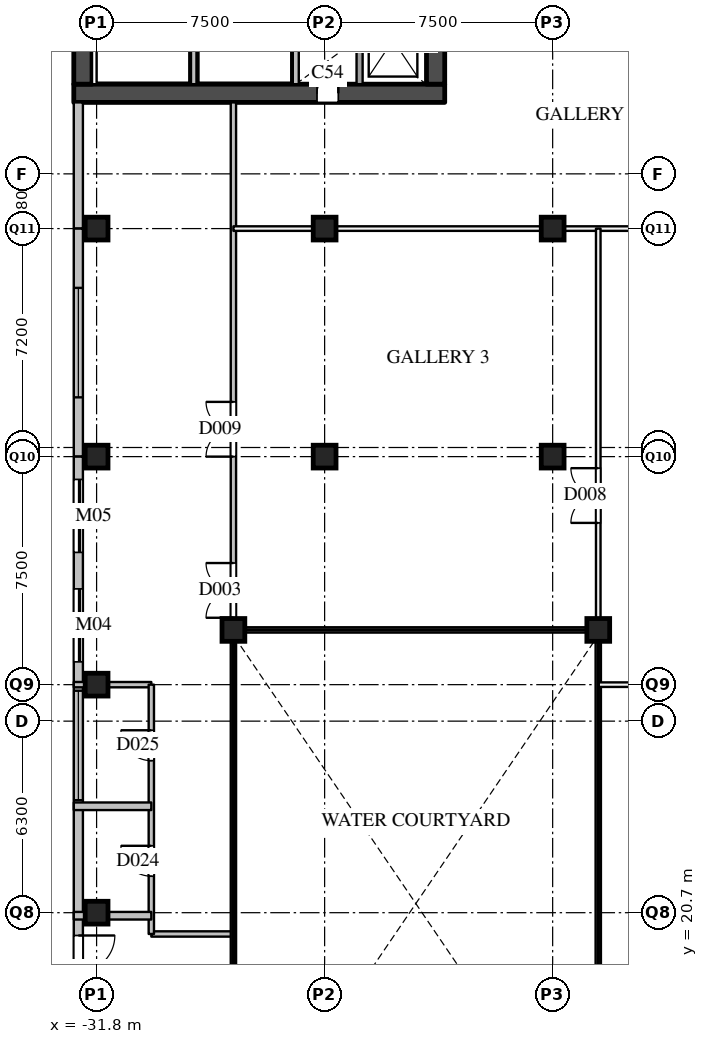
"""IFC4 building model, lengths in metres.
Left out: names, types, materials, properties, quantities, classifications, styles, units other than length and angle.
Written with IfcOpenShell. Run it as: python <this file> out.ifc"""

import sys

from ifc_helpers import new_model, si_unit, direction, frame, frame_2d, origin, origin_2d, place, context, subcontext, project, spatial, rectangle, extrude, element, fill, save


model = new_model("IFC4")
c1 = context("Model", 3, precision=1e-05, world=origin(), true_north=direction((0.0, 1.0)))
c2 = subcontext(c1, "Body", "Model", "MODEL_VIEW")
j1 = project(units=[si_unit("LENGTHUNIT", "METRE"), si_unit("PLANEANGLEUNIT", "RADIAN")], contexts=[c1])
p1 = place(None, origin())
s1 = spatial("IfcSite", under=j1, at=p1, CompositionType="ELEMENT")
p2 = place(p1, origin())
s2 = spatial("IfcBuilding", under=s1, at=p2, CompositionType="ELEMENT")
p3 = place(p2, origin())
s3 = spatial("IfcBuildingStorey", under=s2, at=p3, CompositionType="ELEMENT", Elevation=0.0)
for number, where, z_axis, x_axis in (
    (1, (-31.8, 20.7, 0.0), (0.0, 0.0, 1.0), (1.0, 0.0, 0.0)),
    (2, (-31.8, 28.2, 0.0), (0.0, 0.0, 1.0), (1.0, 0.0, 0.0)),
    (3, (-31.8, 35.7, 0.0), (0.0, 0.0, 1.0), (1.0, 0.0, 0.0)),
    (4, (-31.8, 43.2, 0.0), (0.0, 0.0, 1.0), (1.0, 0.0, 0.0)),
    (5, (-24.3, 35.7, 0.0), (0.0, 0.0, 1.0), (1.0, 0.0, 0.0)),
    (6, (-24.3, 43.2, 0.0), (0.0, 0.0, 1.0), (1.0, 0.0, 0.0)),
    (7, (-16.8, 35.7, 0.0), (0.0, 0.0, 1.0), (1.0, 0.0, 0.0)),
    (8, (-16.8, 43.2, 0.0), (0.0, 0.0, 1.0), (1.0, 0.0, 0.0)),
    (9, (-15.3, 30.0, 0.0), (0.0, 0.0, 1.0), (1.0, 0.0, 0.0)),
    (10, (-27.3, 30.0, 0.0), (0.0, 0.0, 1.0), (1.0, 0.0, 0.0)),
):
    element("IfcColumn", number, at=place(p3, frame(where, z_axis=z_axis, x_axis=x_axis)), inside=s3, PredefinedType="COLUMN", context=c2, shape_type="SweptSolid", body=[
        extrude(rectangle(XDim=0.75, YDim=0.75, at=origin_2d()), origin(), (0.0, 0.0, 1.0), 8.0),
    ])
p4 = place(p3, frame((-32.4, 47.35, 0.0), z_axis=(0.0, 0.0, 1.0), x_axis=(0.0, -1.0, 0.0)))
e11 = element("IfcWall", 11, at=p4, inside=s3, PredefinedType="SOLIDWALL", context=c2, shape_type="SweptSolid", body=[
    extrude(rectangle(XDim=4.15, YDim=0.3, at=frame_2d((2.075, 0.0))), origin(), (0.0, 0.0, 1.0), 7.59),
])
p5 = place(p3, frame((-32.4, 43.2, 0.0), z_axis=(0.0, 0.0, 1.0), x_axis=(0.0, -1.0, 0.0)))
e12 = element("IfcWall", 12, at=p5, inside=s3, PredefinedType="SOLIDWALL", context=c2, shape_type="SweptSolid", body=[
    extrude(rectangle(XDim=7.5, YDim=0.3, at=frame_2d((3.75, 0.0))), origin(), (0.0, 0.0, 1.0), 7.59),
])
p6 = place(p5, frame((1.95, 0.0, 0.9)))
e13 = element("IfcOpeningElement", 13, at=p6, cuts=e12, PredefinedType="OPENING", context=c2, shape_type="SweptSolid", body=[
    extrude(rectangle(XDim=3.6, YDim=3.0, at=frame_2d((1.8, 1.5))), frame((0.0, 0.16, 0.0), z_axis=(0.0, -1.0, 0.0), x_axis=(1.0, 0.0, 0.0)), (0.0, 0.0, 1.0), 0.32),
])
p7 = place(p3, frame((-32.4, 35.7, 0.0), z_axis=(0.0, 0.0, 1.0), x_axis=(0.0, -1.0, 0.0)))
e14 = element("IfcWall", 14, at=p7, inside=s3, PredefinedType="SOLIDWALL", context=c2, shape_type="SweptSolid", body=[
    extrude(rectangle(XDim=7.5, YDim=0.3, at=frame_2d((3.75, 0.0))), origin(), (0.0, 0.0, 1.0), 7.59),
])
p8 = place(p7, frame((4.35, 0.0, 0.0)))
e15 = element("IfcOpeningElement", 15, at=p8, cuts=e14, PredefinedType="OPENING", context=c2, shape_type="SweptSolid", body=[
    extrude(rectangle(XDim=2.4, YDim=2.4, at=frame_2d((1.2, 1.2))), frame((0.0, 0.16, 0.0), z_axis=(0.0, -1.0, 0.0), x_axis=(1.0, 0.0, 0.0)), (0.0, 0.0, 1.0), 0.32),
])
p9 = place(p7, frame((0.75, 0.0, 0.0)))
e16 = element("IfcOpeningElement", 16, at=p9, cuts=e14, PredefinedType="OPENING", context=c2, shape_type="SweptSolid", body=[
    extrude(rectangle(XDim=2.4, YDim=2.4, at=frame_2d((1.2, 1.2))), frame((0.0, 0.16, 0.0), z_axis=(0.0, -1.0, 0.0), x_axis=(1.0, 0.0, 0.0)), (0.0, 0.0, 1.0), 0.32),
])
p10 = place(p3, frame((-32.4, 28.2, 0.0), z_axis=(0.0, 0.0, 1.0), x_axis=(0.0, -1.0, 0.0)))
e17 = element("IfcWall", 17, at=p10, inside=s3, PredefinedType="SOLIDWALL", context=c2, shape_type="SweptSolid", body=[
    extrude(rectangle(XDim=7.5, YDim=0.3, at=frame_2d((3.75, 0.0))), origin(), (0.0, 0.0, 1.0), 7.59),
])
p11 = place(p10, frame((0.2, 0.0, 0.9)))
e18 = element("IfcOpeningElement", 18, at=p11, cuts=e17, PredefinedType="OPENING", context=c2, shape_type="SweptSolid", body=[
    extrude(rectangle(XDim=3.6, YDim=3.0, at=frame_2d((1.8, 1.5))), frame((0.0, 0.16, 0.0), z_axis=(0.0, -1.0, 0.0), x_axis=(1.0, 0.0, 0.0)), (0.0, 0.0, 1.0), 0.32),
])
p12 = place(p3, frame((-32.4, 20.7, 0.0), z_axis=(0.0, 0.0, 1.0), x_axis=(0.0, -1.0, 0.0)))
e19 = element("IfcWall", 19, at=p12, inside=s3, PredefinedType="SOLIDWALL", context=c2, shape_type="SweptSolid", body=[
    extrude(rectangle(XDim=7.5, YDim=0.3, at=frame_2d((3.75, 0.0))), origin(), (0.0, 0.0, 1.0), 7.59),
])
p13 = place(p12, frame((4.35, 0.0, 0.0)))
e20 = element("IfcOpeningElement", 20, at=p13, cuts=e19, PredefinedType="OPENING", context=c2, shape_type="SweptSolid", body=[
    extrude(rectangle(XDim=2.4, YDim=2.7, at=frame_2d((1.2, 1.35))), frame((0.0, 0.16, 0.0), z_axis=(0.0, -1.0, 0.0), x_axis=(1.0, 0.0, 0.0)), (0.0, 0.0, 1.0), 0.32),
])
p14 = place(p12, frame((0.75, 0.0, 0.0)))
e21 = element("IfcOpeningElement", 21, at=p14, cuts=e19, PredefinedType="OPENING", context=c2, shape_type="SweptSolid", body=[
    extrude(rectangle(XDim=2.4, YDim=2.7, at=frame_2d((1.2, 1.35))), frame((0.0, 0.16, 0.0), z_axis=(0.0, -1.0, 0.0), x_axis=(1.0, 0.0, 0.0)), (0.0, 0.0, 1.0), 0.32),
])
p15 = place(p3, frame((-32.55, 47.65, 0.0), z_axis=(0.0, 0.0, 1.0), x_axis=(1.0, 0.0, 0.0)))
e22 = element("IfcWall", 22, at=p15, inside=s3, PredefinedType="SHEAR", context=c2, shape_type="SweptSolid", body=[
    extrude(rectangle(XDim=12.2, YDim=0.6, at=frame_2d((6.1, 0.0))), origin(), (0.0, 0.0, 1.0), 7.59),
])
p16 = place(p15, frame((8.0, 0.0, 0.0)))
e23 = element("IfcOpeningElement", 23, at=p16, cuts=e22, PredefinedType="OPENING", context=c2, shape_type="SweptSolid", body=[
    extrude(rectangle(XDim=0.7, YDim=2.1, at=frame_2d((0.35, 1.05))), frame((0.0, 0.31, 0.0), z_axis=(0.0, -1.0, 0.0), x_axis=(1.0, 0.0, 0.0)), (0.0, 0.0, 1.0), 0.62),
])
p17 = place(p3, frame((-32.25, 47.95, 0.0), z_axis=(0.0, 0.0, 1.0), x_axis=(0.0, 1.0, 0.0)))
e24 = element("IfcWall", 24, at=p17, inside=s3, PredefinedType="SHEAR", context=c2, shape_type="SweptSolid", body=[
    extrude(rectangle(XDim=10.4, YDim=0.6, at=frame_2d((5.2, 0.0))), origin(), (0.0, 0.0, 1.0), 7.59),
])
p18 = place(p17, frame((6.25, 0.0, 0.0)))
e25 = element("IfcOpeningElement", 25, at=p18, cuts=e24, PredefinedType="OPENING", context=c2, shape_type="SweptSolid", body=[
    extrude(rectangle(XDim=1.8, YDim=2.4, at=frame_2d((0.9, 1.2))), frame((0.0, 0.31, 0.0), z_axis=(0.0, -1.0, 0.0), x_axis=(1.0, 0.0, 0.0)), (0.0, 0.0, 1.0), 0.62),
])
p19 = place(p17, frame((8.05, 0.0, 0.0)))
e26 = element("IfcOpeningElement", 26, at=p19, cuts=e24, PredefinedType="OPENING", context=c2, shape_type="SweptSolid", body=[
    extrude(rectangle(XDim=1.8, YDim=2.4, at=frame_2d((0.9, 1.2))), frame((0.0, 0.31, 0.0), z_axis=(0.0, -1.0, 0.0), x_axis=(1.0, 0.0, 0.0)), (0.0, 0.0, 1.0), 0.62),
])
p20 = place(p3, frame((-20.65, 47.95, 0.0), z_axis=(0.0, 0.0, 1.0), x_axis=(0.0, 1.0, 0.0)))
e27 = element("IfcWall", 27, at=p20, inside=s3, PredefinedType="SHEAR", context=c2, shape_type="SweptSolid", body=[
    extrude(rectangle(XDim=10.4, YDim=0.6, at=frame_2d((5.2, 0.0))), origin(), (0.0, 0.0, 1.0), 7.59),
])
p21 = place(p20, frame((3.65, 0.0, 0.0)))
e28 = element("IfcOpeningElement", 28, at=p21, cuts=e27, PredefinedType="OPENING", context=c2, shape_type="SweptSolid", body=[
    extrude(rectangle(XDim=1.8, YDim=2.1, at=frame_2d((0.9, 1.05))), frame((0.0, 0.31, 0.0), z_axis=(0.0, -1.0, 0.0), x_axis=(1.0, 0.0, 0.0)), (0.0, 0.0, 1.0), 0.62),
])
for number, where, z_axis, x_axis in (
    (29, (-28.6, 47.95, 0.0), (0.0, 0.0, 1.0), (0.0, 1.0, 0.0)),
    (30, (-25.25, 47.95, 0.0), (0.0, 0.0, 1.0), (0.0, 1.0, 0.0)),
):
    element("IfcWall", number, at=place(p3, frame(where, z_axis=z_axis, x_axis=x_axis)), inside=s3, PredefinedType="SOLIDWALL", context=c2, shape_type="SweptSolid", body=[
        extrude(rectangle(XDim=2.08, YDim=0.2, at=frame_2d((1.04, 0.0))), origin(), (0.0, 0.0, 1.0), 7.59),
    ])
p22 = place(p3, frame((-23.15, 47.95, 0.0), z_axis=(0.0, 0.0, 1.0), x_axis=(0.0, 1.0, 0.0)))
e31 = element("IfcWall", 31, at=p22, inside=s3, PredefinedType="SOLIDWALL", context=c2, shape_type="SweptSolid", body=[
    extrude(rectangle(XDim=2.9, YDim=0.2, at=frame_2d((1.45, 0.0))), origin(), (0.0, 0.0, 1.0), 7.59),
])
p23 = place(p3, frame((-30.0, 20.0, 0.0), z_axis=(0.0, 0.0, 1.0), x_axis=(1.0, 0.0, 0.0)))
e32 = element("IfcWall", 32, at=p23, inside=s3, PredefinedType="PARTITIONING", context=c2, shape_type="SweptSolid", body=[
    extrude(rectangle(XDim=2.7, YDim=0.175, at=frame_2d((1.35, 0.0))), origin(), (0.0, 0.0, 1.0), 7.59),
])
p24 = place(p3, frame((-32.55, 28.2, 0.0), z_axis=(0.0, 0.0, 1.0), x_axis=(1.0, 0.0, 0.0)))
e33 = element("IfcWall", 33, at=p24, inside=s3, PredefinedType="PARTITIONING", context=c2, shape_type="SweptSolid", body=[
    extrude(rectangle(XDim=2.55, YDim=0.175, at=frame_2d((1.275, 0.0))), origin(), (0.0, 0.0, 1.0), 7.59),
])
p25 = place(p3, frame((-27.3, 30.0, 0.0), z_axis=(0.0, 0.0, 1.0), x_axis=(1.0, 0.0, 0.0)))
e34 = element("IfcWall", 34, at=p25, inside=s3, PredefinedType="PARTITIONING", context=c2, shape_type="SweptSolid", body=[
    extrude(rectangle(XDim=12.0, YDim=0.175, at=frame_2d((6.0, 0.0))), origin(), (0.0, 0.0, 1.0), 7.59),
])
p26 = place(p3, frame((-30.0, 20.0, 0.0), z_axis=(0.0, 0.0, 1.0), x_axis=(0.0, 1.0, 0.0)))
e35 = element("IfcWall", 35, at=p26, inside=s3, PredefinedType="PARTITIONING", context=c2, shape_type="SweptSolid", body=[
    extrude(rectangle(XDim=8.2, YDim=0.175, at=frame_2d((4.1, 0.0))), origin(), (0.0, 0.0, 1.0), 7.59),
])
p27 = place(p26, frame((1.9, 0.0, 0.0)))
e36 = element("IfcOpeningElement", 36, at=p27, cuts=e35, PredefinedType="OPENING", context=c2, shape_type="SweptSolid", body=[
    extrude(rectangle(XDim=1.0, YDim=2.1, at=frame_2d((0.5, 1.05))), frame((0.0, 0.097, 0.0), z_axis=(0.0, -1.0, 0.0), x_axis=(1.0, 0.0, 0.0)), (0.0, 0.0, 1.0), 0.195),
])
p28 = place(p26, frame((5.7, 0.0, 0.0)))
e37 = element("IfcOpeningElement", 37, at=p28, cuts=e35, PredefinedType="OPENING", context=c2, shape_type="SweptSolid", body=[
    extrude(rectangle(XDim=1.0, YDim=2.1, at=frame_2d((0.5, 1.05))), frame((0.0, 0.097, 0.0), z_axis=(0.0, -1.0, 0.0), x_axis=(1.0, 0.0, 0.0)), (0.0, 0.0, 1.0), 0.195),
])
p29 = place(p3, frame((-27.3, 12.0, 0.0), z_axis=(0.0, 0.0, 1.0), x_axis=(0.0, 1.0, 0.0)))
e38 = element("IfcWall", 38, at=p29, inside=s3, PredefinedType="PARTITIONING", context=c2, shape_type="SweptSolid", body=[
    extrude(rectangle(XDim=35.35, YDim=0.175, at=frame_2d((17.675, 0.0))), origin(), (0.0, 0.0, 1.0), 6.79),
])
p30 = place(p29, frame((18.4, 0.0, 0.0)))
e39 = element("IfcOpeningElement", 39, at=p30, cuts=e38, PredefinedType="OPENING", context=c2, shape_type="SweptSolid", body=[
    extrude(rectangle(XDim=1.8, YDim=2.1, at=frame_2d((0.9, 1.05))), frame((0.0, 0.097, 0.0), z_axis=(0.0, -1.0, 0.0), x_axis=(1.0, 0.0, 0.0)), (0.0, 0.0, 1.0), 0.195),
])
p31 = place(p29, frame((23.7, 0.0, 0.0)))
e40 = element("IfcOpeningElement", 40, at=p31, cuts=e38, PredefinedType="OPENING", context=c2, shape_type="SweptSolid", body=[
    extrude(rectangle(XDim=1.8, YDim=2.1, at=frame_2d((0.9, 1.05))), frame((0.0, 0.097, 0.0), z_axis=(0.0, -1.0, 0.0), x_axis=(1.0, 0.0, 0.0)), (0.0, 0.0, 1.0), 0.195),
])
p32 = place(p29, frame((4.688, 0.0, 0.0)))
e41 = element("IfcOpeningElement", 41, at=p32, cuts=e38, PredefinedType="OPENING", context=c2, shape_type="SweptSolid", body=[
    extrude(rectangle(XDim=1.0, YDim=2.1, at=frame_2d((0.5, 1.05))), frame((0.0, 0.097, 0.0), z_axis=(0.0, -1.0, 0.0), x_axis=(1.0, 0.0, 0.0)), (0.0, 0.0, 1.0), 0.195),
])
p33 = place(p3, frame((-15.3, 12.0, 0.0), z_axis=(0.0, 0.0, 1.0), x_axis=(0.0, 1.0, 0.0)))
e42 = element("IfcWall", 42, at=p33, inside=s3, PredefinedType="PARTITIONING", context=c2, shape_type="SweptSolid", body=[
    extrude(rectangle(XDim=18.0, YDim=0.175, at=frame_2d((9.0, 0.0))), origin(), (0.0, 0.0, 1.0), 7.59),
])
p34 = place(p3, frame((-15.3, 28.2, 0.0), z_axis=(0.0, 0.0, 1.0), x_axis=(1.0, 0.0, 0.0)))
e43 = element("IfcWall", 43, at=p34, inside=s3, PredefinedType="PARTITIONING", context=c2, shape_type="SweptSolid", body=[
    extrude(rectangle(XDim=11.25, YDim=0.15, at=frame_2d((5.625, 0.0))), origin(), (0.0, 0.0, 1.0), 6.79),
])
p35 = place(p3, frame((-27.3, 43.2, 0.0), z_axis=(0.0, 0.0, 1.0), x_axis=(1.0, 0.0, 0.0)))
e44 = element("IfcWall", 44, at=p35, inside=s3, PredefinedType="PARTITIONING", context=c2, shape_type="SweptSolid", body=[
    extrude(rectangle(XDim=15.0, YDim=0.15, at=frame_2d((7.5, 0.0))), origin(), (0.0, 0.0, 1.0), 6.79),
])
p36 = place(p3, frame((-15.3, 30.0, 0.0), z_axis=(0.0, 0.0, 1.0), x_axis=(0.0, 1.0, 0.0)))
e45 = element("IfcWall", 45, at=p36, inside=s3, PredefinedType="PARTITIONING", context=c2, shape_type="SweptSolid", body=[
    extrude(rectangle(XDim=13.2, YDim=0.15, at=frame_2d((6.6, 0.0))), origin(), (0.0, 0.0, 1.0), 6.79),
])
p37 = place(p36, frame((3.52, 0.0, 0.0)))
e46 = element("IfcOpeningElement", 46, at=p37, cuts=e45, PredefinedType="OPENING", context=c2, shape_type="SweptSolid", body=[
    extrude(rectangle(XDim=1.8, YDim=2.1, at=frame_2d((0.9, 1.05))), frame((0.0, 0.085, 0.0), z_axis=(0.0, -1.0, 0.0), x_axis=(1.0, 0.0, 0.0)), (0.0, 0.0, 1.0), 0.17),
])
p38 = place(p3, frame((-32.55, 20.6, 0.0), z_axis=(0.0, 0.0, 1.0), x_axis=(1.0, 0.0, 0.0)))
e47 = element("IfcWall", 47, at=p38, inside=s3, PredefinedType="PARTITIONING", context=c2, shape_type="SweptSolid", body=[
    extrude(rectangle(XDim=2.55, YDim=0.25, at=frame_2d((1.275, 0.0))), origin(), (0.0, 0.0, 1.0), 7.59),
])
p39 = place(p3, frame((-32.55, 24.2, 0.0), z_axis=(0.0, 0.0, 1.0), x_axis=(1.0, 0.0, 0.0)))
e48 = element("IfcWall", 48, at=p39, inside=s3, PredefinedType="PARTITIONING", context=c2, shape_type="SweptSolid", body=[
    extrude(rectangle(XDim=2.55, YDim=0.25, at=frame_2d((1.275, 0.0))), origin(), (0.0, 0.0, 1.0), 6.79),
])
p40 = place(p6, origin())
e49 = element("IfcWindow", 49, at=p40, inside=s3, PartitioningType="SINGLE_PANEL", PredefinedType="WINDOW", context=c2, shape_type="SweptSolid", body=[
    extrude(rectangle(XDim=3.6, YDim=3.0, at=frame_2d((1.8, 1.5))), frame((0.0, 0.03, 0.0), z_axis=(0.0, -1.0, 0.0), x_axis=(1.0, 0.0, 0.0)), (0.0, 0.0, 1.0), 0.06),
])
fill(e13, e49)
p41 = place(p8, origin())
e50 = element("IfcDoor", 50, at=p41, inside=s3, OperationType="SLIDING_TO_LEFT", PredefinedType="DOOR", context=c2, shape_type="SweptSolid", body=[
    extrude(rectangle(XDim=2.4, YDim=2.4, at=frame_2d((1.2, 1.2))), frame((0.0, 0.025, 0.0), z_axis=(0.0, -1.0, 0.0), x_axis=(1.0, 0.0, 0.0)), (0.0, 0.0, 1.0), 0.05),
])
fill(e15, e50)
p42 = place(p9, origin())
e51 = element("IfcDoor", 51, at=p42, inside=s3, OperationType="SLIDING_TO_LEFT", PredefinedType="DOOR", context=c2, shape_type="SweptSolid", body=[
    extrude(rectangle(XDim=2.4, YDim=2.4, at=frame_2d((1.2, 1.2))), frame((0.0, 0.025, 0.0), z_axis=(0.0, -1.0, 0.0), x_axis=(1.0, 0.0, 0.0)), (0.0, 0.0, 1.0), 0.05),
])
fill(e16, e51)
p43 = place(p11, origin())
e52 = element("IfcWindow", 52, at=p43, inside=s3, PartitioningType="SINGLE_PANEL", PredefinedType="WINDOW", context=c2, shape_type="SweptSolid", body=[
    extrude(rectangle(XDim=3.6, YDim=3.0, at=frame_2d((1.8, 1.5))), frame((0.0, 0.03, 0.0), z_axis=(0.0, -1.0, 0.0), x_axis=(1.0, 0.0, 0.0)), (0.0, 0.0, 1.0), 0.06),
])
fill(e18, e52)
p44 = place(p14, origin())
e53 = element("IfcDoor", 53, at=p44, inside=s3, OperationType="DOUBLE_DOOR_SINGLE_SWING", PredefinedType="DOOR", context=c2, shape_type="SweptSolid", body=[
    extrude(rectangle(XDim=2.4, YDim=2.7, at=frame_2d((1.2, 1.35))), frame((0.0, 0.025, 0.0), z_axis=(0.0, -1.0, 0.0), x_axis=(1.0, 0.0, 0.0)), (0.0, 0.0, 1.0), 0.05),
])
fill(e21, e53)
p45 = place(p16, origin())
e54 = element("IfcDoor", 54, at=p45, inside=s3, OperationType="SINGLE_SWING_RIGHT", PredefinedType="DOOR", context=c2, shape_type="SweptSolid", body=[
    extrude(rectangle(XDim=0.7, YDim=2.1, at=frame_2d((0.35, 1.05))), frame((0.0, 0.025, 0.0), z_axis=(0.0, -1.0, 0.0), x_axis=(1.0, 0.0, 0.0)), (0.0, 0.0, 1.0), 0.05),
])
fill(e23, e54)
p46 = place(p30, origin())
e55 = element("IfcDoor", 55, at=p46, inside=s3, OperationType="DOUBLE_DOOR_SINGLE_SWING", PredefinedType="DOOR", context=c2, shape_type="SweptSolid", body=[
    extrude(rectangle(XDim=1.8, YDim=2.1, at=frame_2d((0.9, 1.05))), frame((0.0, 0.025, 0.0), z_axis=(0.0, -1.0, 0.0), x_axis=(1.0, 0.0, 0.0)), (0.0, 0.0, 1.0), 0.05),
])
fill(e39, e55)
p47 = place(p37, origin())
e56 = element("IfcDoor", 56, at=p47, inside=s3, OperationType="DOUBLE_DOOR_SINGLE_SWING", PredefinedType="DOOR", context=c2, shape_type="SweptSolid", body=[
    extrude(rectangle(XDim=1.8, YDim=2.1, at=frame_2d((0.9, 1.05))), frame((0.0, 0.025, 0.0), z_axis=(0.0, -1.0, 0.0), x_axis=(1.0, 0.0, 0.0)), (0.0, 0.0, 1.0), 0.05),
])
fill(e46, e56)
p48 = place(p31, origin())
e57 = element("IfcDoor", 57, at=p48, inside=s3, OperationType="DOUBLE_DOOR_SINGLE_SWING", PredefinedType="DOOR", context=c2, shape_type="SweptSolid", body=[
    extrude(rectangle(XDim=1.8, YDim=2.1, at=frame_2d((0.9, 1.05))), frame((0.0, 0.025, 0.0), z_axis=(0.0, -1.0, 0.0), x_axis=(1.0, 0.0, 0.0)), (0.0, 0.0, 1.0), 0.05),
])
fill(e40, e57)
p49 = place(p27, origin())
e58 = element("IfcDoor", 58, at=p49, inside=s3, OperationType="SINGLE_SWING_RIGHT", PredefinedType="DOOR", context=c2, shape_type="SweptSolid", body=[
    extrude(rectangle(XDim=1.0, YDim=2.1, at=frame_2d((0.5, 1.05))), frame((0.0, 0.025, 0.0), z_axis=(0.0, -1.0, 0.0), x_axis=(1.0, 0.0, 0.0)), (0.0, 0.0, 1.0), 0.05),
])
fill(e36, e58)
p50 = place(p28, origin())
e59 = element("IfcDoor", 59, at=p50, inside=s3, OperationType="SINGLE_SWING_RIGHT", PredefinedType="DOOR", context=c2, shape_type="SweptSolid", body=[
    extrude(rectangle(XDim=1.0, YDim=2.1, at=frame_2d((0.5, 1.05))), frame((0.0, 0.025, 0.0), z_axis=(0.0, -1.0, 0.0), x_axis=(1.0, 0.0, 0.0)), (0.0, 0.0, 1.0), 0.05),
])
fill(e37, e59)
save(model, sys.argv[1])
